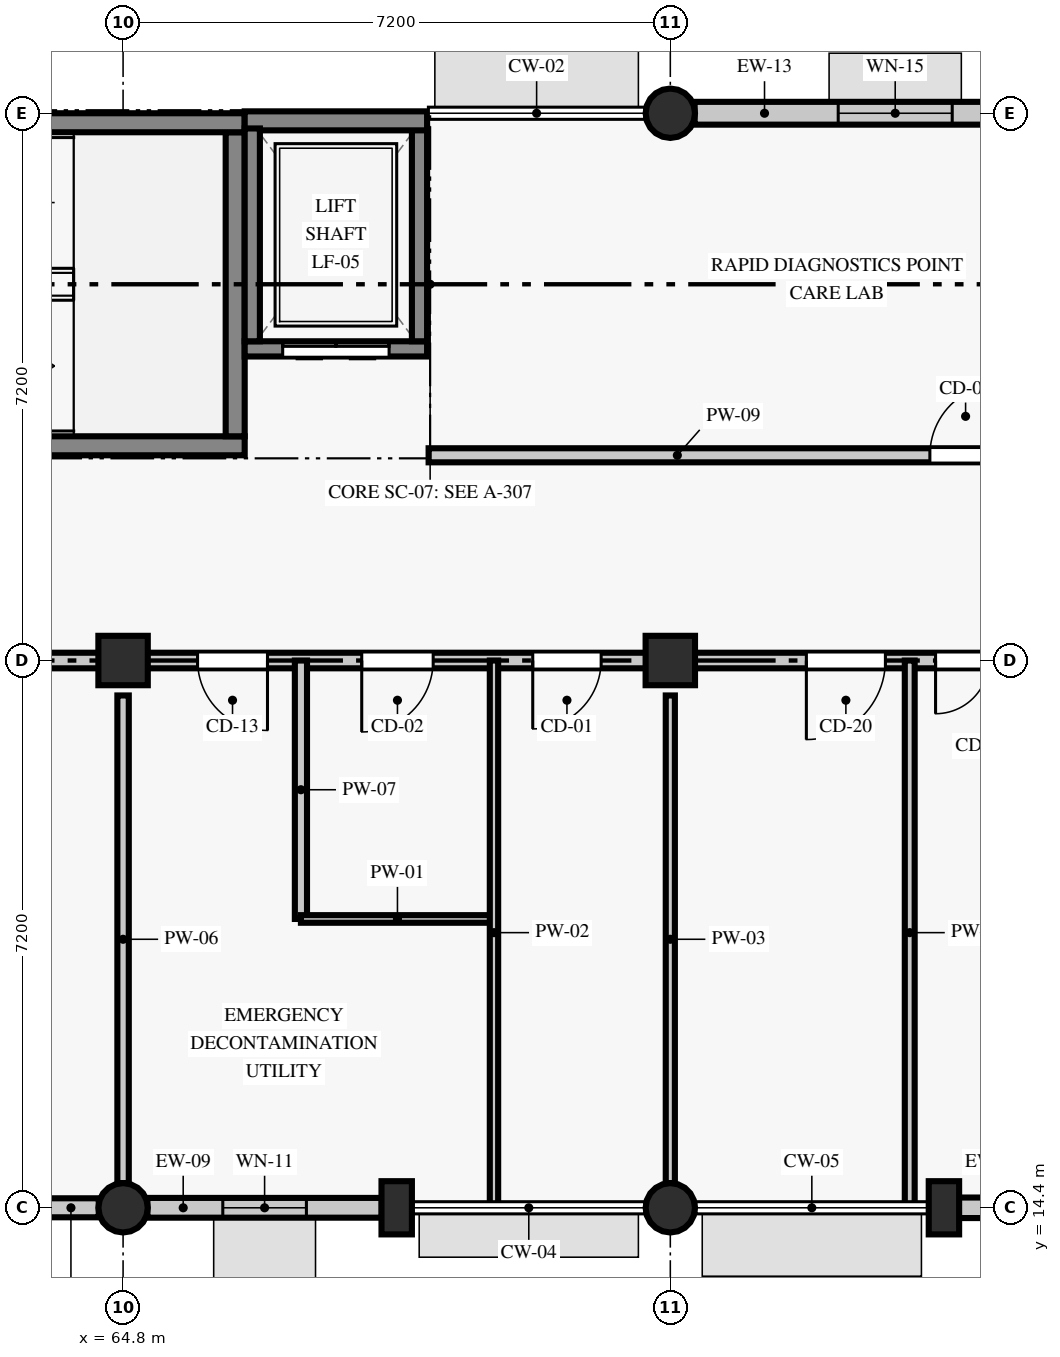
"""IFC4 building model, lengths in metres.
Left out: names, types, materials, properties, quantities, classifications, styles, units other than length and angle.
Written with IfcOpenShell. Run it as: python <this file> out.ifc"""

import sys

from ifc_helpers import new_model, si_unit, direction, frame, frame_2d, origin, origin_2d, place, context, subcontext, project, spatial, rectangle, circle, extrude, element, fill, save


model = new_model("IFC4")
c1 = context("Model", 3, precision=1e-05, world=origin(), true_north=direction((0.0, 1.0)))
c2 = subcontext(c1, "Body", "Model", "MODEL_VIEW")
j1 = project(units=[si_unit("LENGTHUNIT", "METRE"), si_unit("PLANEANGLEUNIT", "RADIAN")], contexts=[c1])
p1 = place(None, origin())
s1 = spatial("IfcSite", under=j1, at=p1, CompositionType="ELEMENT")
p2 = place(p1, origin())
s2 = spatial("IfcBuilding", under=s1, at=p2, CompositionType="ELEMENT")
p3 = place(p2, origin())
s3 = spatial("IfcBuildingStorey", under=s2, at=p3, CompositionType="ELEMENT", Elevation=0.0)
p4 = place(p3, frame((64.8, 14.4, 0.0), z_axis=(0.0, 0.0, 1.0), x_axis=(1.0, 0.0, 0.0)))
e1 = element("IfcColumn", 1, at=p4, inside=s3, PredefinedType="COLUMN", context=c2, shape_type="SweptSolid", body=[
    extrude(circle(Radius=0.325, at=origin_2d()), origin(), (0.0, 0.0, 1.0), 4.51),
])
p5 = place(p3, frame((64.8, 21.6, 0.0), z_axis=(0.0, 0.0, 1.0), x_axis=(1.0, 0.0, 0.0)))
e2 = element("IfcColumn", 2, at=p5, inside=s3, PredefinedType="COLUMN", context=c2, shape_type="SweptSolid", body=[
    extrude(rectangle(XDim=0.65, YDim=0.65, at=origin_2d()), origin(), (0.0, 0.0, 1.0), 4.51),
])
p6 = place(p3, frame((72.0, 14.4, 0.0), z_axis=(0.0, 0.0, 1.0), x_axis=(1.0, 0.0, 0.0)))
e3 = element("IfcColumn", 3, at=p6, inside=s3, PredefinedType="COLUMN", context=c2, shape_type="SweptSolid", body=[
    extrude(circle(Radius=0.325, at=origin_2d()), origin(), (0.0, 0.0, 1.0), 4.51),
])
p7 = place(p3, frame((72.0, 21.6, 0.0), z_axis=(0.0, 0.0, 1.0), x_axis=(1.0, 0.0, 0.0)))
e4 = element("IfcColumn", 4, at=p7, inside=s3, PredefinedType="COLUMN", context=c2, shape_type="SweptSolid", body=[
    extrude(rectangle(XDim=0.65, YDim=0.65, at=origin_2d()), origin(), (0.0, 0.0, 1.0), 4.51),
])
p8 = place(p3, frame((72.0, 28.8, 0.0), z_axis=(0.0, 0.0, 1.0), x_axis=(1.0, 0.0, 0.0)))
e5 = element("IfcColumn", 5, at=p8, inside=s3, PredefinedType="COLUMN", context=c2, shape_type="SweptSolid", body=[
    extrude(circle(Radius=0.325, at=origin_2d()), origin(), (0.0, 0.0, 1.0), 4.51),
])
for number, where, z_axis, x_axis in (
    (6, (68.4, 14.4, 0.0), (0.0, 0.0, 1.0), (1.0, 0.0, 0.0)),
    (7, (75.6, 14.4, 0.0), (0.0, 0.0, 1.0), (1.0, 0.0, 0.0)),
):
    element("IfcColumn", number, at=place(p3, frame(where, z_axis=z_axis, x_axis=x_axis)), inside=s3, PredefinedType="PILASTER", context=c2, shape_type="SweptSolid", body=[
        extrude(rectangle(XDim=0.4, YDim=0.7, at=origin_2d()), origin(), (0.0, 0.0, 1.0), 4.51),
    ])
p9 = place(p3, frame((61.396, 14.4, 0.0), z_axis=(0.0, 0.0, 1.0), x_axis=(1.0, 0.0, 0.0)))
e8 = element("IfcWall", 8, at=p9, inside=s3, PredefinedType="STANDARD", context=c2, shape_type="SweptSolid", body=[
    extrude(rectangle(XDim=3.084, YDim=0.25, at=frame_2d((1.542, 0.0))), origin(), (0.0, 0.0, 1.0), 2.9),
])
p10 = place(p9, frame((0.782, 0.0, 0.0)))
e9 = element("IfcOpeningElement", 9, at=p10, cuts=e8, PredefinedType="OPENING", context=c2, shape_type="SweptSolid", body=[
    extrude(rectangle(XDim=1.52, YDim=2.18, at=frame_2d((0.76, 1.09))), frame((0.0, 0.135, 0.0), z_axis=(0.0, -1.0, 0.0), x_axis=(1.0, 0.0, 0.0)), (0.0, 0.0, 1.0), 0.27),
])
p11 = place(p3, frame((65.12, 14.4, 0.0), z_axis=(0.0, 0.0, 1.0), x_axis=(1.0, 0.0, 0.0)))
e10 = element("IfcWall", 10, at=p11, inside=s3, PredefinedType="STANDARD", context=c2, shape_type="SweptSolid", body=[
    extrude(rectangle(XDim=3.084, YDim=0.26, at=frame_2d((1.542, 0.0))), origin(), (0.0, 0.0, 1.0), 2.9),
])
p12 = place(p11, frame((0.992, 0.0, 0.9)))
e11 = element("IfcOpeningElement", 11, at=p12, cuts=e10, PredefinedType="OPENING", context=c2, shape_type="SweptSolid", body=[
    extrude(rectangle(XDim=1.1, YDim=1.42, at=frame_2d((0.55, 0.71))), frame((0.0, 0.14, 0.0), z_axis=(0.0, -1.0, 0.0), x_axis=(1.0, 0.0, 0.0)), (0.0, 0.0, 1.0), 0.28),
])
p13 = place(p3, frame((75.796, 14.4, 0.0), z_axis=(0.0, 0.0, 1.0), x_axis=(1.0, 0.0, 0.0)))
e12 = element("IfcWall", 12, at=p13, inside=s3, PredefinedType="STANDARD", context=c2, shape_type="SweptSolid", body=[
    extrude(rectangle(XDim=3.084, YDim=0.27, at=frame_2d((1.542, 0.0))), origin(), (0.0, 0.0, 1.0), 2.9),
])
p14 = place(p13, frame((0.942, 0.0, 0.9)))
e13 = element("IfcOpeningElement", 13, at=p14, cuts=e12, PredefinedType="OPENING", context=c2, shape_type="SweptSolid", body=[
    extrude(rectangle(XDim=1.2, YDim=1.42, at=frame_2d((0.6, 0.71))), frame((0.0, 0.145, 0.0), z_axis=(0.0, -1.0, 0.0), x_axis=(1.0, 0.0, 0.0)), (0.0, 0.0, 1.0), 0.29),
])
p15 = place(p3, frame((77.598, 28.8, 0.0), z_axis=(0.0, 0.0, 1.0), x_axis=(-1.0, 0.0, 0.0)))
e14 = element("IfcWall", 14, at=p15, inside=s3, PredefinedType="STANDARD", context=c2, shape_type="SweptSolid", body=[
    extrude(rectangle(XDim=5.278, YDim=0.3, at=frame_2d((2.639, 0.0))), origin(), (0.0, 0.0, 1.0), 4.51),
])
p16 = place(p15, frame((1.889, 0.0, 0.9)))
e15 = element("IfcOpeningElement", 15, at=p16, cuts=e14, PredefinedType="OPENING", context=c2, shape_type="SweptSolid", body=[
    extrude(rectangle(XDim=1.5, YDim=1.42, at=frame_2d((0.75, 0.71))), frame((0.0, 0.16, 0.0), z_axis=(0.0, -1.0, 0.0), x_axis=(1.0, 0.0, 0.0)), (0.0, 0.0, 1.0), 0.32),
])
p17 = place(p3, frame((57.6, 24.425, 0.0), z_axis=(0.0, 0.0, 1.0), x_axis=(1.0, 0.0, 0.0)))
e16 = element("IfcWall", 16, at=p17, inside=s3, PredefinedType="SHEAR", context=c2, shape_type="SweptSolid", body=[
    extrude(rectangle(XDim=8.8, YDim=0.25, at=frame_2d((4.4, 0.0))), origin(), (0.0, 0.0, 1.0), 4.51),
])
p18 = place(p17, frame((0.3, 0.0, 0.0)))
e17 = element("IfcOpeningElement", 17, at=p18, cuts=e16, PredefinedType="OPENING", context=c2, shape_type="SweptSolid", body=[
    extrude(rectangle(XDim=1.5, YDim=2.15, at=frame_2d((0.75, 1.075))), frame((0.0, 0.135, 0.0), z_axis=(0.0, -1.0, 0.0), x_axis=(1.0, 0.0, 0.0)), (0.0, 0.0, 1.0), 0.27),
])
p19 = place(p3, frame((66.275, 24.55, 0.0), z_axis=(0.0, 0.0, 1.0), x_axis=(0.0, 1.0, 0.0)))
e18 = element("IfcWall", 18, at=p19, inside=s3, PredefinedType="SHEAR", context=c2, shape_type="SweptSolid", body=[
    extrude(rectangle(XDim=4.0, YDim=0.25, at=frame_2d((2.0, 0.0))), origin(), (0.0, 0.0, 1.0), 4.51),
])
p20 = place(p3, frame((66.4, 28.675, 0.0), z_axis=(0.0, 0.0, 1.0), x_axis=(-1.0, 0.0, 0.0)))
e19 = element("IfcWall", 19, at=p20, inside=s3, PredefinedType="SHEAR", context=c2, shape_type="SweptSolid", body=[
    extrude(rectangle(XDim=8.8, YDim=0.25, at=frame_2d((4.4, 0.0))), origin(), (0.0, 0.0, 1.0), 4.51),
])
p21 = place(p20, frame((6.7, 0.0, 0.0)))
e20 = element("IfcOpeningElement", 20, at=p21, cuts=e19, PredefinedType="OPENING", context=c2, shape_type="SweptSolid", body=[
    extrude(rectangle(XDim=1.85, YDim=2.2, at=frame_2d((0.925, 1.1))), frame((0.0, 0.135, 0.0), z_axis=(0.0, -1.0, 0.0), x_axis=(1.0, 0.0, 0.0)), (0.0, 0.0, 1.0), 0.27),
])
p22 = place(p3, frame((66.4, 25.7, 0.0), z_axis=(0.0, 0.0, 1.0), x_axis=(1.0, 0.0, 0.0)))
e21 = element("IfcWall", 21, at=p22, inside=s3, PredefinedType="SHEAR", context=c2, shape_type="SweptSolid", body=[
    extrude(rectangle(XDim=2.4, YDim=0.2, at=frame_2d((1.2, 0.0))), origin(), (0.0, 0.0, 1.0), 4.51),
])
p23 = place(p22, frame((0.5, 0.0, 0.0)))
e22 = element("IfcOpeningElement", 22, at=p23, cuts=e21, PredefinedType="OPENING", context=c2, shape_type="SweptSolid", body=[
    extrude(rectangle(XDim=1.4, YDim=2.15, at=frame_2d((0.7, 1.075))), frame((0.0, 0.11, 0.0), z_axis=(0.0, -1.0, 0.0), x_axis=(1.0, 0.0, 0.0)), (0.0, 0.0, 1.0), 0.22),
])
p24 = place(p3, frame((68.7, 25.8, 0.0), z_axis=(0.0, 0.0, 1.0), x_axis=(0.0, 1.0, 0.0)))
e23 = element("IfcWall", 23, at=p24, inside=s3, PredefinedType="SHEAR", context=c2, shape_type="SweptSolid", body=[
    extrude(rectangle(XDim=2.8, YDim=0.2, at=frame_2d((1.4, 0.0))), origin(), (0.0, 0.0, 1.0), 4.51),
])
p25 = place(p3, frame((68.8, 28.7, 0.0), z_axis=(0.0, 0.0, 1.0), x_axis=(-1.0, 0.0, 0.0)))
e24 = element("IfcWall", 24, at=p25, inside=s3, PredefinedType="SHEAR", context=c2, shape_type="SweptSolid", body=[
    extrude(rectangle(XDim=2.4, YDim=0.25, at=frame_2d((1.2, 0.0))), origin(), (0.0, 0.0, 1.0), 4.51),
])
p26 = place(p3, frame((66.5, 28.6, 0.0), z_axis=(0.0, 0.0, 1.0), x_axis=(0.0, -1.0, 0.0)))
e25 = element("IfcWall", 25, at=p26, inside=s3, PredefinedType="SHEAR", context=c2, shape_type="SweptSolid", body=[
    extrude(rectangle(XDim=2.8, YDim=0.2, at=frame_2d((1.4, 0.0))), origin(), (0.0, 0.0, 1.0), 4.51),
])
p27 = place(p3, frame((50.725, 21.6, 0.0), z_axis=(0.0, 0.0, 1.0), x_axis=(1.0, 0.0, 0.0)))
e26 = element("IfcWall", 26, at=p27, inside=s3, PredefinedType="PARTITIONING", context=c2, shape_type="SweptSolid", body=[
    extrude(rectangle(XDim=35.35, YDim=0.205, at=frame_2d((17.675, 0.0))), origin(), (0.0, 0.0, 1.0), 3.66),
])
p28 = place(p27, frame((2.544, 0.0, 0.0)))
e27 = element("IfcOpeningElement", 27, at=p28, cuts=e26, PredefinedType="OPENING", context=c2, shape_type="SweptSolid", body=[
    extrude(rectangle(XDim=1.34, YDim=2.14, at=frame_2d((0.67, 1.07))), frame((0.0, 0.113, 0.0), z_axis=(0.0, -1.0, 0.0), x_axis=(1.0, 0.0, 0.0)), (0.0, 0.0, 1.0), 0.225),
])
p29 = place(p27, frame((10.122, 0.0, 0.0)))
e28 = element("IfcOpeningElement", 28, at=p29, cuts=e26, PredefinedType="OPENING", context=c2, shape_type="SweptSolid", body=[
    extrude(rectangle(XDim=1.08, YDim=2.18, at=frame_2d((0.54, 1.09))), frame((0.0, 0.113, 0.0), z_axis=(0.0, -1.0, 0.0), x_axis=(1.0, 0.0, 0.0)), (0.0, 0.0, 1.0), 0.225),
])
p30 = place(p27, frame((15.055, 0.0, 0.0)))
e29 = element("IfcOpeningElement", 29, at=p30, cuts=e26, PredefinedType="OPENING", context=c2, shape_type="SweptSolid", body=[
    extrude(rectangle(XDim=0.92, YDim=2.18, at=frame_2d((0.46, 1.09))), frame((0.0, 0.113, 0.0), z_axis=(0.0, -1.0, 0.0), x_axis=(1.0, 0.0, 0.0)), (0.0, 0.0, 1.0), 0.225),
])
p31 = place(p27, frame((17.215, 0.0, 0.0)))
e30 = element("IfcOpeningElement", 30, at=p31, cuts=e26, PredefinedType="OPENING", context=c2, shape_type="SweptSolid", body=[
    extrude(rectangle(XDim=0.94, YDim=2.08, at=frame_2d((0.47, 1.04))), frame((0.0, 0.113, 0.0), z_axis=(0.0, -1.0, 0.0), x_axis=(1.0, 0.0, 0.0)), (0.0, 0.0, 1.0), 0.225),
])
p32 = place(p27, frame((19.465, 0.0, 0.0)))
e31 = element("IfcOpeningElement", 31, at=p32, cuts=e26, PredefinedType="OPENING", context=c2, shape_type="SweptSolid", body=[
    extrude(rectangle(XDim=0.9, YDim=2.08, at=frame_2d((0.45, 1.04))), frame((0.0, 0.113, 0.0), z_axis=(0.0, -1.0, 0.0), x_axis=(1.0, 0.0, 0.0)), (0.0, 0.0, 1.0), 0.225),
])
p33 = place(p27, frame((23.065, 0.0, 0.0)))
e32 = element("IfcOpeningElement", 32, at=p33, cuts=e26, PredefinedType="OPENING", context=c2, shape_type="SweptSolid", body=[
    extrude(rectangle(XDim=1.04, YDim=2.23, at=frame_2d((0.52, 1.115))), frame((0.0, 0.113, 0.0), z_axis=(0.0, -1.0, 0.0), x_axis=(1.0, 0.0, 0.0)), (0.0, 0.0, 1.0), 0.225),
])
p34 = place(p27, frame((24.765, 0.0, 0.0)))
e33 = element("IfcOpeningElement", 33, at=p34, cuts=e26, PredefinedType="OPENING", context=c2, shape_type="SweptSolid", body=[
    extrude(rectangle(XDim=1.4, YDim=2.16, at=frame_2d((0.7, 1.08))), frame((0.0, 0.113, 0.0), z_axis=(0.0, -1.0, 0.0), x_axis=(1.0, 0.0, 0.0)), (0.0, 0.0, 1.0), 0.225),
])
p35 = place(p27, frame((31.098, 0.0, 0.0)))
e34 = element("IfcOpeningElement", 34, at=p35, cuts=e26, PredefinedType="OPENING", context=c2, shape_type="SweptSolid", body=[
    extrude(rectangle(XDim=1.46, YDim=2.18, at=frame_2d((0.73, 1.09))), frame((0.0, 0.113, 0.0), z_axis=(0.0, -1.0, 0.0), x_axis=(1.0, 0.0, 0.0)), (0.0, 0.0, 1.0), 0.225),
])
p36 = place(p3, frame((64.8, 14.725, 0.0), z_axis=(0.0, 0.0, 1.0), x_axis=(0.0, 1.0, 0.0)))
e35 = element("IfcWall", 35, at=p36, inside=s3, PredefinedType="PARTITIONING", context=c2, shape_type="SweptSolid", body=[
    extrude(rectangle(XDim=6.415, YDim=0.15, at=frame_2d((3.208, 0.0))), origin(), (0.0, 0.0, 1.0), 3.91),
])
p37 = place(p3, frame((67.14, 18.2, 0.0), z_axis=(0.0, 0.0, 1.0), x_axis=(0.0, 1.0, 0.0)))
e36 = element("IfcWall", 36, at=p37, inside=s3, PredefinedType="PARTITIONING", context=c2, shape_type="SweptSolid", body=[
    extrude(rectangle(XDim=3.4, YDim=0.16, at=frame_2d((1.7, 0.0))), origin(), (0.0, 0.0, 1.0), 3.66),
])
p38 = place(p3, frame((67.14, 18.2, 0.0), z_axis=(0.0, 0.0, 1.0), x_axis=(1.0, 0.0, 0.0)))
e37 = element("IfcWall", 37, at=p38, inside=s3, PredefinedType="PARTITIONING", context=c2, shape_type="SweptSolid", body=[
    extrude(rectangle(XDim=2.54, YDim=0.1, at=frame_2d((1.27, 0.0))), origin(), (0.0, 0.0, 1.0), 4.51),
])
p39 = place(p3, frame((69.68, 14.44, 0.0), z_axis=(0.0, 0.0, 1.0), x_axis=(0.0, 1.0, 0.0)))
e38 = element("IfcWall", 38, at=p39, inside=s3, PredefinedType="PARTITIONING", context=c2, shape_type="SweptSolid", body=[
    extrude(rectangle(XDim=7.16, YDim=0.11, at=frame_2d((3.58, 0.0))), origin(), (0.0, 0.0, 1.0), 3.66),
])
p40 = place(p3, frame((72.0, 14.725, 0.0), z_axis=(0.0, 0.0, 1.0), x_axis=(0.0, 1.0, 0.0)))
e39 = element("IfcWall", 39, at=p40, inside=s3, PredefinedType="PARTITIONING", context=c2, shape_type="SweptSolid", body=[
    extrude(rectangle(XDim=6.415, YDim=0.12, at=frame_2d((3.208, 0.0))), origin(), (0.0, 0.0, 1.0), 3.91),
])
p41 = place(p3, frame((75.15, 14.44, 0.0), z_axis=(0.0, 0.0, 1.0), x_axis=(0.0, 1.0, 0.0)))
e40 = element("IfcWall", 40, at=p41, inside=s3, PredefinedType="PARTITIONING", context=c2, shape_type="SweptSolid", body=[
    extrude(rectangle(XDim=7.16, YDim=0.13, at=frame_2d((3.58, 0.0))), origin(), (0.0, 0.0, 1.0), 3.66),
])
p42 = place(p3, frame((68.82, 24.3, 0.0), z_axis=(0.0, 0.0, 1.0), x_axis=(1.0, 0.0, 0.0)))
e41 = element("IfcWall", 41, at=p42, inside=s3, PredefinedType="PARTITIONING", context=c2, shape_type="SweptSolid", body=[
    extrude(rectangle(XDim=8.76, YDim=0.185, at=frame_2d((4.38, 0.0))), origin(), (0.0, 0.0, 1.0), 3.91),
])
p43 = place(p42, frame((6.595, 0.0, 0.0)))
e42 = element("IfcOpeningElement", 42, at=p43, cuts=e41, PredefinedType="OPENING", context=c2, shape_type="SweptSolid", body=[
    extrude(rectangle(XDim=0.94, YDim=2.08, at=frame_2d((0.47, 1.04))), frame((0.0, 0.103, 0.0), z_axis=(0.0, -1.0, 0.0), x_axis=(1.0, 0.0, 0.0)), (0.0, 0.0, 1.0), 0.205),
])
p44 = place(p12, origin())
e43 = element("IfcWindow", 43, at=p44, inside=s3, PartitioningType="SINGLE_PANEL", PredefinedType="WINDOW", context=c2, shape_type="SweptSolid", body=[
    extrude(rectangle(XDim=1.1, YDim=1.42, at=frame_2d((0.55, 0.71))), frame((0.0, 0.03, 0.0), z_axis=(0.0, -1.0, 0.0), x_axis=(1.0, 0.0, 0.0)), (0.0, 0.0, 1.0), 0.06),
])
fill(e11, e43)
p45 = place(p16, origin())
e44 = element("IfcWindow", 44, at=p45, inside=s3, PartitioningType="SINGLE_PANEL", PredefinedType="WINDOW", context=c2, shape_type="SweptSolid", body=[
    extrude(rectangle(XDim=1.5, YDim=1.42, at=frame_2d((0.75, 0.71))), frame((0.0, 0.03, 0.0), z_axis=(0.0, -1.0, 0.0), x_axis=(1.0, 0.0, 0.0)), (0.0, 0.0, 1.0), 0.06),
])
fill(e15, e44)
p46 = place(p23, frame((1.4, 0.0, 0.0), z_axis=(0.0, 0.0, 1.0), x_axis=(-1.0, 0.0, 0.0)))
e45 = element("IfcDoor", 45, at=p46, inside=s3, OperationType="DOUBLE_DOOR_SLIDING", PredefinedType="DOOR", context=c2, shape_type="SweptSolid", body=[
    extrude(rectangle(XDim=1.4, YDim=2.15, at=frame_2d((0.7, 1.075))), frame((0.0, 0.025, 0.0), z_axis=(0.0, -1.0, 0.0), x_axis=(1.0, 0.0, 0.0)), (0.0, 0.0, 1.0), 0.05),
])
fill(e22, e45)
p47 = place(p30, frame((0.92, 0.0, 0.0), z_axis=(0.0, 0.0, 1.0), x_axis=(-1.0, 0.0, 0.0)))
e46 = element("IfcDoor", 46, at=p47, inside=s3, OperationType="SINGLE_SWING_LEFT", PredefinedType="DOOR", context=c2, shape_type="SweptSolid", body=[
    extrude(rectangle(XDim=0.92, YDim=2.18, at=frame_2d((0.46, 1.09))), frame((0.0, 0.025, 0.0), z_axis=(0.0, -1.0, 0.0), x_axis=(1.0, 0.0, 0.0)), (0.0, 0.0, 1.0), 0.05),
])
fill(e29, e46)
p48 = place(p31, frame((0.94, 0.0, 0.0), z_axis=(0.0, 0.0, 1.0), x_axis=(-1.0, 0.0, 0.0)))
e47 = element("IfcDoor", 47, at=p48, inside=s3, OperationType="SINGLE_SWING_RIGHT", PredefinedType="DOOR", context=c2, shape_type="SweptSolid", body=[
    extrude(rectangle(XDim=0.94, YDim=2.08, at=frame_2d((0.47, 1.04))), frame((0.0, 0.025, 0.0), z_axis=(0.0, -1.0, 0.0), x_axis=(1.0, 0.0, 0.0)), (0.0, 0.0, 1.0), 0.05),
])
fill(e30, e47)
p49 = place(p32, frame((0.9, 0.0, 0.0), z_axis=(0.0, 0.0, 1.0), x_axis=(-1.0, 0.0, 0.0)))
e48 = element("IfcDoor", 48, at=p49, inside=s3, OperationType="SINGLE_SWING_RIGHT", PredefinedType="DOOR", context=c2, shape_type="SweptSolid", body=[
    extrude(rectangle(XDim=0.9, YDim=2.08, at=frame_2d((0.45, 1.04))), frame((0.0, 0.025, 0.0), z_axis=(0.0, -1.0, 0.0), x_axis=(1.0, 0.0, 0.0)), (0.0, 0.0, 1.0), 0.05),
])
fill(e31, e48)
p50 = place(p33, frame((1.04, 0.0, 0.0), z_axis=(0.0, 0.0, 1.0), x_axis=(-1.0, 0.0, 0.0)))
e49 = element("IfcDoor", 49, at=p50, inside=s3, OperationType="SINGLE_SWING_RIGHT", PredefinedType="DOOR", context=c2, shape_type="SweptSolid", body=[
    extrude(rectangle(XDim=1.04, YDim=2.23, at=frame_2d((0.52, 1.115))), frame((0.0, 0.025, 0.0), z_axis=(0.0, -1.0, 0.0), x_axis=(1.0, 0.0, 0.0)), (0.0, 0.0, 1.0), 0.05),
])
fill(e32, e49)
p51 = place(p34, frame((1.4, 0.0, 0.0), z_axis=(0.0, 0.0, 1.0), x_axis=(-1.0, 0.0, 0.0)))
e50 = element("IfcDoor", 50, at=p51, inside=s3, OperationType="DOUBLE_DOOR_SINGLE_SWING", PredefinedType="DOOR", context=c2, shape_type="SweptSolid", body=[
    extrude(rectangle(XDim=1.4, YDim=2.16, at=frame_2d((0.7, 1.08))), frame((0.0, 0.025, 0.0), z_axis=(0.0, -1.0, 0.0), x_axis=(1.0, 0.0, 0.0)), (0.0, 0.0, 1.0), 0.05),
])
fill(e33, e50)
p52 = place(p43, origin())
e51 = element("IfcDoor", 51, at=p52, inside=s3, OperationType="SINGLE_SWING_RIGHT", PredefinedType="DOOR", context=c2, shape_type="SweptSolid", body=[
    extrude(rectangle(XDim=0.94, YDim=2.08, at=frame_2d((0.47, 1.04))), frame((0.0, 0.025, 0.0), z_axis=(0.0, -1.0, 0.0), x_axis=(1.0, 0.0, 0.0)), (0.0, 0.0, 1.0), 0.05),
])
fill(e42, e51)
save(model, sys.argv[1])
